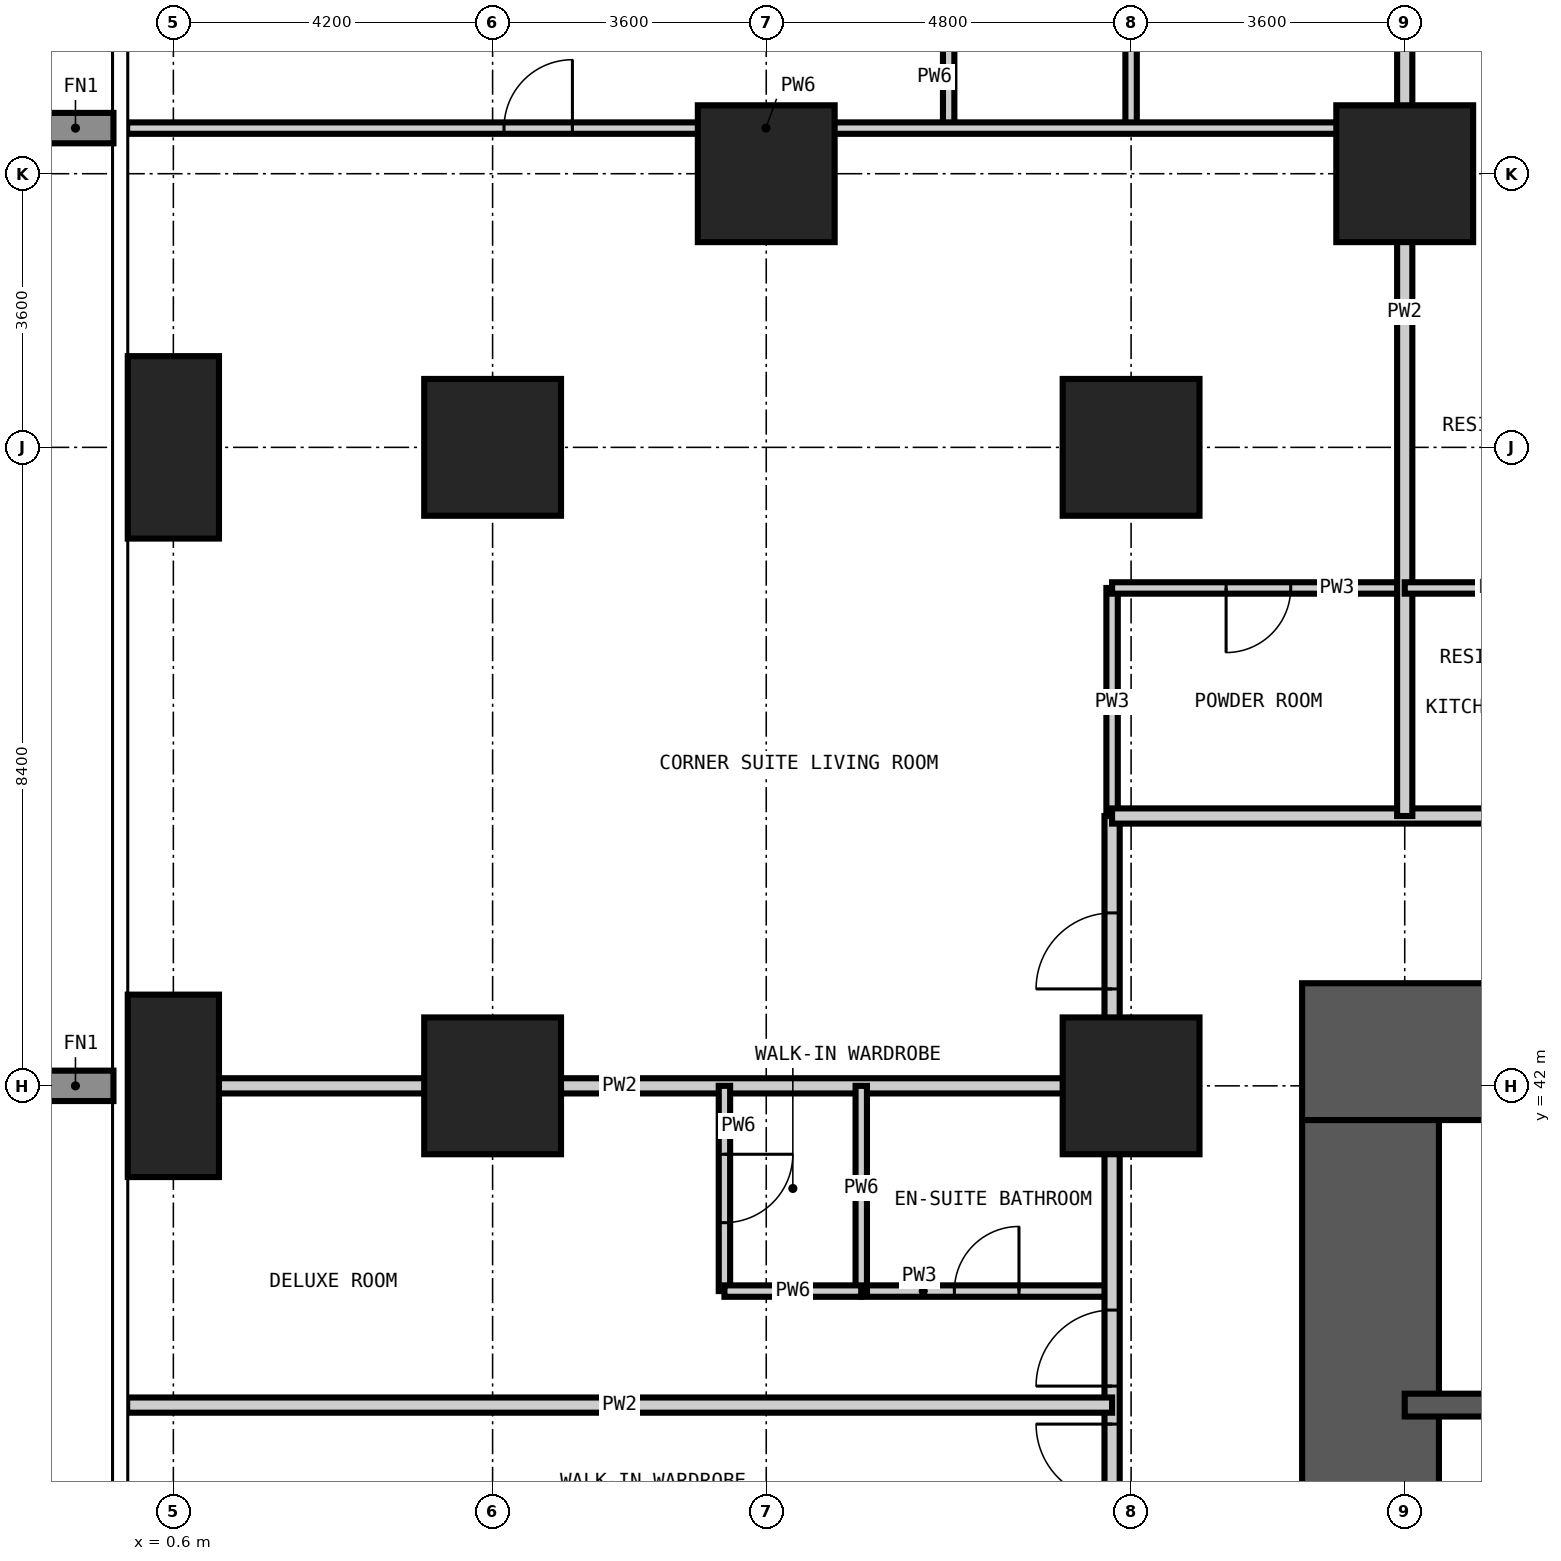
"""IFC4 building model, lengths in metres.
Left out: names, types, materials, properties, quantities, classifications, styles, units other than length and angle.
Written with IfcOpenShell. Run it as: python <this file> out.ifc"""

import sys

from ifc_helpers import new_model, si_unit, direction, frame, frame_2d, origin, origin_2d, place, context, subcontext, project, spatial, rectangle, extrude, element, fill, save


model = new_model("IFC4")
c1 = context("Model", 3, precision=1e-05, world=origin(), true_north=direction((0.0, 1.0)))
c2 = subcontext(c1, "Body", "Model", "MODEL_VIEW")
j1 = project(units=[si_unit("LENGTHUNIT", "METRE"), si_unit("PLANEANGLEUNIT", "RADIAN")], contexts=[c1])
p1 = place(None, origin())
s1 = spatial("IfcSite", under=j1, at=p1, CompositionType="ELEMENT")
p2 = place(p1, origin())
s2 = spatial("IfcBuilding", under=s1, at=p2, CompositionType="ELEMENT")
p3 = place(p2, frame((0.0, 0.0, 45.0)))
s3 = spatial("IfcBuildingStorey", under=s2, at=p3, CompositionType="ELEMENT", Elevation=45.0)
for number, where, z_axis, x_axis in (
    (1, (0.6, 42.0, -0.35), (0.0, 0.0, 1.0), (1.0, 0.0, 0.0)),
    (2, (0.6, 50.4, -0.35), (0.0, 0.0, 1.0), (1.0, 0.0, 0.0)),
):
    element("IfcColumn", number, at=place(p3, frame(where, z_axis=z_axis, x_axis=x_axis)), inside=s3, PredefinedType="COLUMN", context=c2, shape_type="SweptSolid", body=[
        extrude(rectangle(XDim=1.2, YDim=2.4, at=origin_2d()), origin(), (0.0, 0.0, 1.0), 3.6),
    ])
for number, where, z_axis, x_axis in (
    (3, (4.8, 42.0, -0.35), (0.0, 0.0, 1.0), (1.0, 0.0, 0.0)),
    (4, (4.8, 50.4, -0.35), (0.0, 0.0, 1.0), (1.0, 0.0, 0.0)),
    (5, (8.4, 54.0, -0.35), (0.0, 0.0, 1.0), (1.0, 0.0, 0.0)),
    (6, (13.2, 42.0, -0.35), (0.0, 0.0, 1.0), (1.0, 0.0, 0.0)),
    (7, (13.2, 50.4, -0.35), (0.0, 0.0, 1.0), (1.0, 0.0, 0.0)),
    (8, (16.8, 54.0, -0.35), (0.0, 0.0, 1.0), (1.0, 0.0, 0.0)),
):
    element("IfcColumn", number, at=place(p3, frame(where, z_axis=z_axis, x_axis=x_axis)), inside=s3, PredefinedType="COLUMN", context=c2, shape_type="SweptSolid", body=[
        extrude(rectangle(XDim=1.8, YDim=1.8, at=origin_2d()), origin(), (0.0, 0.0, 1.0), 3.6),
    ])
p4 = place(p3, frame((43.35, 42.45, -0.35), z_axis=(0.0, 0.0, 1.0), x_axis=(-1.0, 0.0, 0.0)))
e9 = element("IfcWall", 9, at=p4, inside=s3, PredefinedType="SHEAR", context=c2, shape_type="SweptSolid", body=[
    extrude(rectangle(XDim=27.9, YDim=1.8, at=frame_2d((13.95, 0.0))), origin(), (0.0, 0.0, 1.0), 3.6),
])
p5 = place(p4, frame((21.85, 0.0, 0.35)))
e10 = element("IfcOpeningElement", 10, at=p5, cuts=e9, PredefinedType="OPENING", context=c2, shape_type="SweptSolid", body=[
    extrude(rectangle(XDim=1.0, YDim=2.1, at=frame_2d((0.5, 1.05))), frame((0.0, 0.91, 0.0), z_axis=(0.0, -1.0, 0.0), x_axis=(1.0, 0.0, 0.0)), (0.0, 0.0, 1.0), 1.82),
])
p6 = place(p4, frame((11.25, 0.0, 0.35)))
e11 = element("IfcOpeningElement", 11, at=p6, cuts=e9, PredefinedType="OPENING", context=c2, shape_type="SweptSolid", body=[
    extrude(rectangle(XDim=1.2, YDim=2.2, at=frame_2d((0.6, 1.1))), frame((0.0, 0.91, 0.0), z_axis=(0.0, -1.0, 0.0), x_axis=(1.0, 0.0, 0.0)), (0.0, 0.0, 1.0), 1.82),
])
p7 = place(p3, frame((16.35, 41.55, -0.35), z_axis=(0.0, 0.0, 1.0), x_axis=(0.0, -1.0, 0.0)))
e12 = element("IfcWall", 12, at=p7, inside=s3, PredefinedType="SHEAR", context=c2, shape_type="SweptSolid", body=[
    extrude(rectangle(XDim=24.3, YDim=1.8, at=frame_2d((12.15, 0.0))), origin(), (0.0, 0.0, 1.0), 3.6),
])
p8 = place(p7, frame((11.25, 0.0, 0.35)))
e13 = element("IfcOpeningElement", 13, at=p8, cuts=e12, PredefinedType="OPENING", context=c2, shape_type="SweptSolid", body=[
    extrude(rectangle(XDim=1.8, YDim=2.2, at=frame_2d((0.9, 1.1))), frame((0.0, 0.91, 0.0), z_axis=(0.0, -1.0, 0.0), x_axis=(1.0, 0.0, 0.0)), (0.0, 0.0, 1.0), 1.82),
])
p9 = place(p7, frame((20.05, 0.0, 0.35)))
e14 = element("IfcOpeningElement", 14, at=p9, cuts=e12, PredefinedType="OPENING", context=c2, shape_type="SweptSolid", body=[
    extrude(rectangle(XDim=1.0, YDim=2.1, at=frame_2d((0.5, 1.05))), frame((0.0, 0.91, 0.0), z_axis=(0.0, -1.0, 0.0), x_axis=(1.0, 0.0, 0.0)), (0.0, 0.0, 1.0), 1.82),
])
p10 = place(p7, frame((5.35, 0.0, 0.35)))
e15 = element("IfcOpeningElement", 15, at=p10, cuts=e12, PredefinedType="OPENING", context=c2, shape_type="SweptSolid", body=[
    extrude(rectangle(XDim=1.0, YDim=2.1, at=frame_2d((0.5, 1.05))), frame((0.0, 0.91, 0.0), z_axis=(0.0, -1.0, 0.0), x_axis=(1.0, 0.0, 0.0)), (0.0, 0.0, 1.0), 1.82),
])
p11 = place(p3, frame((16.8, 37.8, -0.35), z_axis=(0.0, 0.0, 1.0), x_axis=(1.0, 0.0, 0.0)))
e16 = element("IfcWall", 16, at=p11, inside=s3, PredefinedType="SHEAR", context=c2, shape_type="SweptSolid", body=[
    extrude(rectangle(XDim=8.4, YDim=0.3, at=frame_2d((4.2, 0.0))), origin(), (0.0, 0.0, 1.0), 3.6),
])
p12 = place(p3, frame((12.95, 45.55, 0.0), z_axis=(0.0, 0.0, 1.0), x_axis=(0.0, 1.0, 0.0)))
e17 = element("IfcWall", 17, at=p12, inside=s3, PredefinedType="PARTITIONING", context=c2, shape_type="SweptSolid", body=[
    extrude(rectangle(XDim=3.0, YDim=0.15, at=frame_2d((1.5, 0.0))), origin(), (0.0, 0.0, 1.0), 3.25),
])
p13 = place(p3, frame((9.65, 39.3, 0.0), z_axis=(0.0, 0.0, 1.0), x_axis=(1.0, 0.0, 0.0)))
e18 = element("IfcWall", 18, at=p13, inside=s3, PredefinedType="PARTITIONING", context=c2, shape_type="SweptSolid", body=[
    extrude(rectangle(XDim=3.3, YDim=0.15, at=frame_2d((1.65, 0.0))), origin(), (0.0, 0.0, 1.0), 3.25),
])
p14 = place(p13, frame((1.225, 0.0, 0.0)))
e19 = element("IfcOpeningElement", 19, at=p14, cuts=e18, PredefinedType="OPENING", context=c2, shape_type="SweptSolid", body=[
    extrude(rectangle(XDim=0.85, YDim=2.1, at=frame_2d((0.425, 1.05))), frame((0.0, 0.085, 0.0), z_axis=(0.0, -1.0, 0.0), x_axis=(1.0, 0.0, 0.0)), (0.0, 0.0, 1.0), 0.17),
])
p15 = place(p3, frame((12.95, 48.55, 0.0), z_axis=(0.0, 0.0, 1.0), x_axis=(1.0, 0.0, 0.0)))
e20 = element("IfcWall", 20, at=p15, inside=s3, PredefinedType="PARTITIONING", context=c2, shape_type="SweptSolid", body=[
    extrude(rectangle(XDim=3.85, YDim=0.15, at=frame_2d((1.925, 0.0))), origin(), (0.0, 0.0, 1.0), 3.25),
])
p16 = place(p15, frame((1.5, 0.0, 0.0)))
e21 = element("IfcOpeningElement", 21, at=p16, cuts=e20, PredefinedType="OPENING", context=c2, shape_type="SweptSolid", body=[
    extrude(rectangle(XDim=0.85, YDim=2.1, at=frame_2d((0.425, 1.05))), frame((0.0, 0.085, 0.0), z_axis=(0.0, -1.0, 0.0), x_axis=(1.0, 0.0, 0.0)), (0.0, 0.0, 1.0), 0.17),
])
p17 = place(p3, frame((12.95, 12.95, 0.0), z_axis=(0.0, 0.0, 1.0), x_axis=(0.0, 1.0, 0.0)))
e22 = element("IfcWall", 22, at=p17, inside=s3, PredefinedType="PARTITIONING", context=c2, shape_type="SweptSolid", body=[
    extrude(rectangle(XDim=32.6, YDim=0.2, at=frame_2d((16.3, 0.0))), origin(), (0.0, 0.0, 1.0), 3.25),
])
p18 = place(p17, frame((8.45, 0.0, 0.0)))
e23 = element("IfcOpeningElement", 23, at=p18, cuts=e22, PredefinedType="OPENING", context=c2, shape_type="SweptSolid", body=[
    extrude(rectangle(XDim=1.0, YDim=2.2, at=frame_2d((0.5, 1.1))), frame((0.0, 0.11, 0.0), z_axis=(0.0, -1.0, 0.0), x_axis=(1.0, 0.0, 0.0)), (0.0, 0.0, 1.0), 0.22),
])
p19 = place(p17, frame((16.7, 0.0, 0.0)))
e24 = element("IfcOpeningElement", 24, at=p19, cuts=e22, PredefinedType="OPENING", context=c2, shape_type="SweptSolid", body=[
    extrude(rectangle(XDim=1.0, YDim=2.2, at=frame_2d((0.5, 1.1))), frame((0.0, 0.11, 0.0), z_axis=(0.0, -1.0, 0.0), x_axis=(1.0, 0.0, 0.0)), (0.0, 0.0, 1.0), 0.22),
])
p20 = place(p17, frame((23.6, 0.0, 0.0)))
e25 = element("IfcOpeningElement", 25, at=p20, cuts=e22, PredefinedType="OPENING", context=c2, shape_type="SweptSolid", body=[
    extrude(rectangle(XDim=1.0, YDim=2.2, at=frame_2d((0.5, 1.1))), frame((0.0, 0.11, 0.0), z_axis=(0.0, -1.0, 0.0), x_axis=(1.0, 0.0, 0.0)), (0.0, 0.0, 1.0), 0.22),
])
p21 = place(p17, frame((25.1, 0.0, 0.0)))
e26 = element("IfcOpeningElement", 26, at=p21, cuts=e22, PredefinedType="OPENING", context=c2, shape_type="SweptSolid", body=[
    extrude(rectangle(XDim=1.0, YDim=2.2, at=frame_2d((0.5, 1.1))), frame((0.0, 0.11, 0.0), z_axis=(0.0, -1.0, 0.0), x_axis=(1.0, 0.0, 0.0)), (0.0, 0.0, 1.0), 0.22),
])
p22 = place(p17, frame((1.425, 0.0, 0.0)))
e27 = element("IfcOpeningElement", 27, at=p22, cuts=e22, PredefinedType="OPENING", context=c2, shape_type="SweptSolid", body=[
    extrude(rectangle(XDim=1.0, YDim=2.2, at=frame_2d((0.5, 1.1))), frame((0.0, 0.11, 0.0), z_axis=(0.0, -1.0, 0.0), x_axis=(1.0, 0.0, 0.0)), (0.0, 0.0, 1.0), 0.22),
])
p23 = place(p17, frame((30.325, 0.0, 0.0)))
e28 = element("IfcOpeningElement", 28, at=p23, cuts=e22, PredefinedType="OPENING", context=c2, shape_type="SweptSolid", body=[
    extrude(rectangle(XDim=1.0, YDim=2.2, at=frame_2d((0.5, 1.1))), frame((0.0, 0.11, 0.0), z_axis=(0.0, -1.0, 0.0), x_axis=(1.0, 0.0, 0.0)), (0.0, 0.0, 1.0), 0.22),
])
p24 = place(p3, frame((12.95, 45.55, 0.0), z_axis=(0.0, 0.0, 1.0), x_axis=(1.0, 0.0, 0.0)))
e29 = element("IfcWall", 29, at=p24, inside=s3, PredefinedType="PARTITIONING", context=c2, shape_type="SweptSolid", body=[
    extrude(rectangle(XDim=32.3, YDim=0.2, at=frame_2d((16.15, 0.0))), origin(), (0.0, 0.0, 1.0), 3.25),
])
p25 = place(p24, frame((6.65, 0.0, 0.0)))
e30 = element("IfcOpeningElement", 30, at=p25, cuts=e29, PredefinedType="OPENING", context=c2, shape_type="SweptSolid", body=[
    extrude(rectangle(XDim=1.0, YDim=2.2, at=frame_2d((0.5, 1.1))), frame((0.0, 0.11, 0.0), z_axis=(0.0, -1.0, 0.0), x_axis=(1.0, 0.0, 0.0)), (0.0, 0.0, 1.0), 0.22),
])
p26 = place(p24, frame((15.05, 0.0, 0.0)))
e31 = element("IfcOpeningElement", 31, at=p26, cuts=e29, PredefinedType="OPENING", context=c2, shape_type="SweptSolid", body=[
    extrude(rectangle(XDim=1.0, YDim=2.2, at=frame_2d((0.5, 1.1))), frame((0.0, 0.11, 0.0), z_axis=(0.0, -1.0, 0.0), x_axis=(1.0, 0.0, 0.0)), (0.0, 0.0, 1.0), 0.22),
])
p27 = place(p24, frame((23.45, 0.0, 0.0)))
e32 = element("IfcOpeningElement", 32, at=p27, cuts=e29, PredefinedType="OPENING", context=c2, shape_type="SweptSolid", body=[
    extrude(rectangle(XDim=1.0, YDim=2.2, at=frame_2d((0.5, 1.1))), frame((0.0, 0.11, 0.0), z_axis=(0.0, -1.0, 0.0), x_axis=(1.0, 0.0, 0.0)), (0.0, 0.0, 1.0), 0.22),
])
p28 = place(p3, frame((16.8, 45.55, 0.0), z_axis=(0.0, 0.0, 1.0), x_axis=(0.0, 1.0, 0.0)))
e33 = element("IfcWall", 33, at=p28, inside=s3, PredefinedType="PARTITIONING", context=c2, shape_type="SweptSolid", body=[
    extrude(rectangle(XDim=13.258, YDim=0.2, at=frame_2d((6.629, 0.0))), origin(), (0.0, 0.0, 1.0), 3.25),
])
for number, where, z_axis, x_axis in (
    (34, (-0.008, 37.8, 0.0), (0.0, 0.0, 1.0), (1.0, 0.0, 0.0)),
    (35, (-0.008, 42.0, 0.0), (0.0, 0.0, 1.0), (1.0, 0.0, 0.0)),
):
    element("IfcWall", number, at=place(p3, frame(where, z_axis=z_axis, x_axis=x_axis)), inside=s3, PredefinedType="PARTITIONING", context=c2, shape_type="SweptSolid", body=[
        extrude(rectangle(XDim=12.958, YDim=0.2, at=frame_2d((6.479, 0.0))), origin(), (0.0, 0.0, 1.0), 3.25),
    ])
p29 = place(p3, frame((7.85, 39.3, 0.0), z_axis=(0.0, 0.0, 1.0), x_axis=(0.0, 1.0, 0.0)))
e36 = element("IfcWall", 36, at=p29, inside=s3, PredefinedType="PARTITIONING", context=c2, shape_type="SweptSolid", body=[
    extrude(rectangle(XDim=2.7, YDim=0.15, at=frame_2d((1.35, 0.0))), origin(), (0.0, 0.0, 1.0), 3.25),
])
p30 = place(p29, frame((0.9, 0.0, 0.0)))
e37 = element("IfcOpeningElement", 37, at=p30, cuts=e36, PredefinedType="OPENING", context=c2, shape_type="SweptSolid", body=[
    extrude(rectangle(XDim=0.9, YDim=2.1, at=frame_2d((0.45, 1.05))), frame((0.0, 0.085, 0.0), z_axis=(0.0, -1.0, 0.0), x_axis=(1.0, 0.0, 0.0)), (0.0, 0.0, 1.0), 0.17),
])
p31 = place(p3, frame((9.65, 39.3, 0.0), z_axis=(0.0, 0.0, 1.0), x_axis=(0.0, 1.0, 0.0)))
e38 = element("IfcWall", 38, at=p31, inside=s3, PredefinedType="PARTITIONING", context=c2, shape_type="SweptSolid", body=[
    extrude(rectangle(XDim=2.7, YDim=0.15, at=frame_2d((1.35, 0.0))), origin(), (0.0, 0.0, 1.0), 3.25),
])
p32 = place(p3, frame((10.8, 54.6, 0.0), z_axis=(0.0, 0.0, 1.0), x_axis=(0.0, 1.0, 0.0)))
e39 = element("IfcWall", 39, at=p32, inside=s3, PredefinedType="PARTITIONING", context=c2, shape_type="SweptSolid", body=[
    extrude(rectangle(XDim=3.0, YDim=0.15, at=frame_2d((1.5, 0.0))), origin(), (0.0, 0.0, 1.0), 3.25),
])
p33 = place(p32, frame((1.05, 0.0, 0.0)))
e40 = element("IfcOpeningElement", 40, at=p33, cuts=e39, PredefinedType="OPENING", context=c2, shape_type="SweptSolid", body=[
    extrude(rectangle(XDim=0.9, YDim=2.1, at=frame_2d((0.45, 1.05))), frame((0.0, 0.085, 0.0), z_axis=(0.0, -1.0, 0.0), x_axis=(1.0, 0.0, 0.0)), (0.0, 0.0, 1.0), 0.17),
])
p34 = place(p3, frame((13.2, 54.6, 0.0), z_axis=(0.0, 0.0, 1.0), x_axis=(0.0, 1.0, 0.0)))
e41 = element("IfcWall", 41, at=p34, inside=s3, PredefinedType="PARTITIONING", context=c2, shape_type="SweptSolid", body=[
    extrude(rectangle(XDim=3.0, YDim=0.15, at=frame_2d((1.5, 0.0))), origin(), (0.0, 0.0, 1.0), 3.25),
])
p35 = place(p3, frame((7.85, 39.3, 0.0), z_axis=(0.0, 0.0, 1.0), x_axis=(1.0, 0.0, 0.0)))
e42 = element("IfcWall", 42, at=p35, inside=s3, PredefinedType="PARTITIONING", context=c2, shape_type="SweptSolid", body=[
    extrude(rectangle(XDim=1.8, YDim=0.15, at=frame_2d((0.9, 0.0))), origin(), (0.0, 0.0, 1.0), 3.25),
])
p36 = place(p3, frame((16.8, 48.55, 0.0), z_axis=(0.0, 0.0, 1.0), x_axis=(1.0, 0.0, 0.0)))
e43 = element("IfcWall", 43, at=p36, inside=s3, PredefinedType="PARTITIONING", context=c2, shape_type="SweptSolid", body=[
    extrude(rectangle(XDim=2.4, YDim=0.15, at=frame_2d((1.2, 0.0))), origin(), (0.0, 0.0, 1.0), 3.25),
])
p37 = place(p3, frame((-0.008, 54.6, 0.0), z_axis=(0.0, 0.0, 1.0), x_axis=(1.0, 0.0, 0.0)))
e44 = element("IfcWall", 44, at=p37, inside=s3, PredefinedType="PARTITIONING", context=c2, shape_type="SweptSolid", body=[
    extrude(rectangle(XDim=16.808, YDim=0.15, at=frame_2d((8.404, 0.0))), origin(), (0.0, 0.0, 1.0), 3.25),
])
p38 = place(p37, frame((4.958, 0.0, 0.0)))
e45 = element("IfcOpeningElement", 45, at=p38, cuts=e44, PredefinedType="OPENING", context=c2, shape_type="SweptSolid", body=[
    extrude(rectangle(XDim=0.9, YDim=2.1, at=frame_2d((0.45, 1.05))), frame((0.0, 0.085, 0.0), z_axis=(0.0, -1.0, 0.0), x_axis=(1.0, 0.0, 0.0)), (0.0, 0.0, 1.0), 0.17),
])
p39 = place(p20, origin())
e46 = element("IfcDoor", 46, at=p39, inside=s3, OperationType="SINGLE_SWING_RIGHT", PredefinedType="DOOR", context=c2, shape_type="SweptSolid", body=[
    extrude(rectangle(XDim=1.0, YDim=2.2, at=frame_2d((0.5, 1.1))), frame((0.0, 0.025, 0.0), z_axis=(0.0, -1.0, 0.0), x_axis=(1.0, 0.0, 0.0)), (0.0, 0.0, 1.0), 0.05),
])
fill(e25, e46)
p40 = place(p21, origin())
e47 = element("IfcDoor", 47, at=p40, inside=s3, OperationType="SINGLE_SWING_LEFT", PredefinedType="DOOR", context=c2, shape_type="SweptSolid", body=[
    extrude(rectangle(XDim=1.0, YDim=2.2, at=frame_2d((0.5, 1.1))), frame((0.0, 0.025, 0.0), z_axis=(0.0, -1.0, 0.0), x_axis=(1.0, 0.0, 0.0)), (0.0, 0.0, 1.0), 0.05),
])
fill(e26, e47)
p41 = place(p14, origin())
e48 = element("IfcDoor", 48, at=p41, inside=s3, OperationType="SINGLE_SWING_RIGHT", PredefinedType="DOOR", context=c2, shape_type="SweptSolid", body=[
    extrude(rectangle(XDim=0.85, YDim=2.1, at=frame_2d((0.425, 1.05))), frame((0.0, 0.025, 0.0), z_axis=(0.0, -1.0, 0.0), x_axis=(1.0, 0.0, 0.0)), (0.0, 0.0, 1.0), 0.05),
])
fill(e19, e48)
p42 = place(p30, frame((0.9, 0.0, 0.0), z_axis=(0.0, 0.0, 1.0), x_axis=(-1.0, 0.0, 0.0)))
e49 = element("IfcDoor", 49, at=p42, inside=s3, OperationType="SINGLE_SWING_LEFT", PredefinedType="DOOR", context=c2, shape_type="SweptSolid", body=[
    extrude(rectangle(XDim=0.9, YDim=2.1, at=frame_2d((0.45, 1.05))), frame((0.0, 0.025, 0.0), z_axis=(0.0, -1.0, 0.0), x_axis=(1.0, 0.0, 0.0)), (0.0, 0.0, 1.0), 0.05),
])
fill(e37, e49)
p43 = place(p23, origin())
e50 = element("IfcDoor", 50, at=p43, inside=s3, OperationType="SINGLE_SWING_LEFT", PredefinedType="DOOR", context=c2, shape_type="SweptSolid", body=[
    extrude(rectangle(XDim=1.0, YDim=2.2, at=frame_2d((0.5, 1.1))), frame((0.0, 0.025, 0.0), z_axis=(0.0, -1.0, 0.0), x_axis=(1.0, 0.0, 0.0)), (0.0, 0.0, 1.0), 0.05),
])
fill(e28, e50)
p44 = place(p16, frame((0.85, 0.0, 0.0), z_axis=(0.0, 0.0, 1.0), x_axis=(-1.0, 0.0, 0.0)))
e51 = element("IfcDoor", 51, at=p44, inside=s3, OperationType="SINGLE_SWING_RIGHT", PredefinedType="DOOR", context=c2, shape_type="SweptSolid", body=[
    extrude(rectangle(XDim=0.85, YDim=2.1, at=frame_2d((0.425, 1.05))), frame((0.0, 0.025, 0.0), z_axis=(0.0, -1.0, 0.0), x_axis=(1.0, 0.0, 0.0)), (0.0, 0.0, 1.0), 0.05),
])
fill(e21, e51)
p45 = place(p38, origin())
e52 = element("IfcDoor", 52, at=p45, inside=s3, OperationType="SINGLE_SWING_RIGHT", PredefinedType="DOOR", context=c2, shape_type="SweptSolid", body=[
    extrude(rectangle(XDim=0.9, YDim=2.1, at=frame_2d((0.45, 1.05))), frame((0.0, 0.025, 0.0), z_axis=(0.0, -1.0, 0.0), x_axis=(1.0, 0.0, 0.0)), (0.0, 0.0, 1.0), 0.05),
])
fill(e45, e52)
save(model, sys.argv[1])
